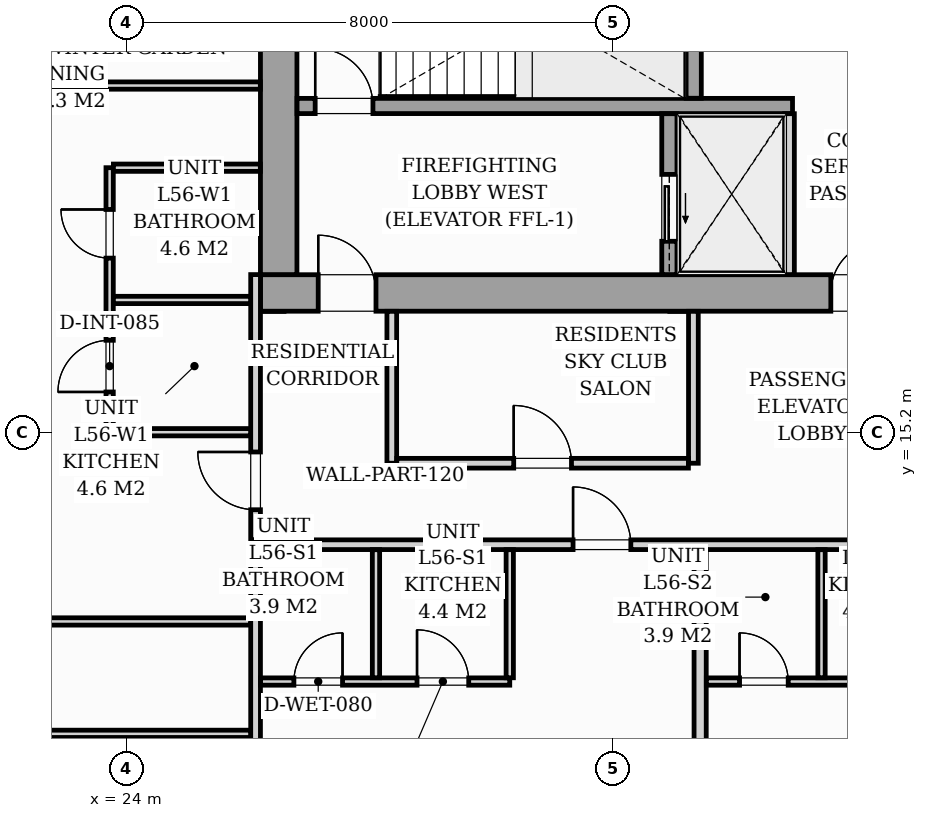
"""IFC4 building model, lengths in metres.
Left out: names, types, materials, properties, quantities, classifications, styles, units other than length and angle.
Written with IfcOpenShell. Run it as: python <this file> out.ifc"""

import sys

from ifc_helpers import new_model, si_unit, direction, frame, frame_2d, origin, origin_2d, place, context, subcontext, project, spatial, rectangle, i_section, extrude, source, transform, mapped, element, fill, save


model = new_model("IFC4")
c1 = context("Model", 3, precision=1e-05, world=origin(), true_north=direction((0.0, 1.0)))
c2 = subcontext(c1, "Body", "Model", "MODEL_VIEW")
j1 = project(units=[si_unit("LENGTHUNIT", "METRE"), si_unit("PLANEANGLEUNIT", "RADIAN")], contexts=[c1])
p1 = place(None, origin())
s1 = spatial("IfcSite", under=j1, at=p1, CompositionType="ELEMENT")
p2 = place(p1, origin())
s2 = spatial("IfcBuilding", under=s1, at=p2, CompositionType="ELEMENT")
p3 = place(p2, frame((0.0, 0.0, 195.4)))
s3 = spatial("IfcBuildingStorey", under=s2, at=p3, CompositionType="ELEMENT", Elevation=195.4)
m1 = source(origin(), c2, "Body", "SweptSolid", [
    extrude(i_section(OverallWidth=0.416, OverallDepth=0.446, WebThickness=0.039, FlangeThickness=0.063, FilletRadius=0.018, at=origin_2d()), origin(), (0.0, 0.0, 1.0), 3.196),
])
for number, where, z_axis, x_axis in (
    (1, (26.4, 17.4, 0.002), (0.0, 0.0, 1.0), (1.0, 0.0, 0.0)),
    (2, (33.12, 17.4, 0.002), (0.0, 0.0, 1.0), (1.0, 0.0, 0.0)),
):
    element("IfcColumn", number, at=place(p3, frame(where, z_axis=z_axis, x_axis=x_axis)), inside=s3, PredefinedType="PILASTER", context=c2, shape_type="MappedRepresentation", body=[
        mapped(m1, transform((0.0, 0.0, 0.0), scale=1.0)),
    ])
p4 = place(p3, frame((26.2, 17.5, 0.0), z_axis=(0.0, 0.0, 1.0), x_axis=(1.0, 0.0, 0.0)))
e3 = element("IfcWall", 3, at=p4, inside=s3, PredefinedType="SHEAR", context=c2, shape_type="SweptSolid", body=[
    extrude(rectangle(XDim=19.6, YDim=0.6, at=frame_2d((9.8, 0.0))), origin(), (0.0, 0.0, 1.0), 3.2),
])
p5 = place(p4, frame((0.95, 0.0, 0.0)))
e4 = element("IfcOpeningElement", 4, at=p5, cuts=e3, PredefinedType="OPENING", context=c2, shape_type="SweptSolid", body=[
    extrude(rectangle(XDim=0.95, YDim=2.06, at=frame_2d((0.475, 1.03))), frame((0.0, 0.31, 0.0), z_axis=(0.0, -1.0, 0.0), x_axis=(1.0, 0.0, 0.0)), (0.0, 0.0, 1.0), 0.62),
])
p6 = place(p4, frame((9.38, 0.0, 0.0)))
e5 = element("IfcOpeningElement", 5, at=p6, cuts=e3, PredefinedType="OPENING", context=c2, shape_type="SweptSolid", body=[
    extrude(rectangle(XDim=0.85, YDim=2.0, at=frame_2d((0.425, 1.0))), frame((0.0, 0.31, 0.0), z_axis=(0.0, -1.0, 0.0), x_axis=(1.0, 0.0, 0.0)), (0.0, 0.0, 1.0), 0.62),
])
p7 = place(p4, frame((17.55, 0.0, 0.0)))
e6 = element("IfcOpeningElement", 6, at=p7, cuts=e3, PredefinedType="OPENING", context=c2, shape_type="SweptSolid", body=[
    extrude(rectangle(XDim=0.95, YDim=2.06, at=frame_2d((0.475, 1.03))), frame((0.0, 0.31, 0.0), z_axis=(0.0, -1.0, 0.0), x_axis=(1.0, 0.0, 0.0)), (0.0, 0.0, 1.0), 0.62),
])
p8 = place(p3, frame((26.5, 17.802, 0.0), z_axis=(0.0, 0.0, 1.0), x_axis=(0.0, 1.0, 0.0)))
e7 = element("IfcWall", 7, at=p8, inside=s3, PredefinedType="SHEAR", context=c2, shape_type="SweptSolid", body=[
    extrude(rectangle(XDim=5.796, YDim=0.6, at=frame_2d((2.898, 0.0))), origin(), (0.0, 0.0, 1.0), 3.2),
])
p9 = place(p3, frame((26.802, 20.575, 0.0), z_axis=(0.0, 0.0, 1.0), x_axis=(1.0, 0.0, 0.0)))
e8 = element("IfcWall", 8, at=p9, inside=s3, PredefinedType="SOLIDWALL", context=c2, shape_type="SweptSolid", body=[
    extrude(rectangle(XDim=8.148, YDim=0.25, at=frame_2d((4.074, 0.0))), origin(), (0.0, 0.0, 1.0), 3.2),
])
p10 = place(p9, frame((0.298, 0.0, 0.0)))
e9 = element("IfcOpeningElement", 9, at=p10, cuts=e8, PredefinedType="OPENING", context=c2, shape_type="SweptSolid", body=[
    extrude(rectangle(XDim=0.95, YDim=2.06, at=frame_2d((0.475, 1.03))), frame((0.0, 0.135, 0.0), z_axis=(0.0, -1.0, 0.0), x_axis=(1.0, 0.0, 0.0)), (0.0, 0.0, 1.0), 0.27),
])
p11 = place(p3, frame((33.325, 20.702, 0.0), z_axis=(0.0, 0.0, 1.0), x_axis=(0.0, 1.0, 0.0)))
e10 = element("IfcWall", 10, at=p11, inside=s3, PredefinedType="SOLIDWALL", context=c2, shape_type="SweptSolid", body=[
    extrude(rectangle(XDim=2.896, YDim=0.25, at=frame_2d((1.448, 0.0))), origin(), (0.0, 0.0, 1.0), 3.2),
])
p12 = place(p3, frame((32.925, 17.802, 0.0), z_axis=(0.0, 0.0, 1.0), x_axis=(0.0, 1.0, 0.0)))
e11 = element("IfcWall", 11, at=p12, inside=s3, PredefinedType="SOLIDWALL", context=c2, shape_type="SweptSolid", body=[
    extrude(rectangle(XDim=2.646, YDim=0.25, at=frame_2d((1.323, 0.0))), origin(), (0.0, 0.0, 1.0), 3.2),
])
p13 = place(p12, frame((0.548, 0.0, 0.0)))
e12 = element("IfcOpeningElement", 12, at=p13, cuts=e11, PredefinedType="OPENING", context=c2, shape_type="SweptSolid", body=[
    extrude(rectangle(XDim=1.1, YDim=2.08, at=frame_2d((0.55, 1.04))), frame((0.0, 0.135, 0.0), z_axis=(0.0, -1.0, 0.0), x_axis=(1.0, 0.0, 0.0)), (0.0, 0.0, 1.0), 0.27),
])
p14 = place(p3, frame((34.9, 17.802, 0.0), z_axis=(0.0, 0.0, 1.0), x_axis=(0.0, 1.0, 0.0)))
e13 = element("IfcWall", 13, at=p14, inside=s3, PredefinedType="PARTITIONING", context=c2, shape_type="SweptSolid", body=[
    extrude(rectangle(XDim=2.646, YDim=0.16, at=frame_2d((1.323, 0.0))), origin(), (0.0, 0.0, 1.0), 2.94),
])
p15 = place(p3, frame((26.12, 13.36, 0.0), z_axis=(0.0, 0.0, 1.0), x_axis=(1.0, 0.0, 0.0)))
e14 = element("IfcWall", 14, at=p15, inside=s3, PredefinedType="PARTITIONING", context=c2, shape_type="SweptSolid", body=[
    extrude(rectangle(XDim=19.76, YDim=0.16, at=frame_2d((9.88, 0.0))), origin(), (0.0, 0.0, 1.0), 2.94),
])
p16 = place(p15, frame((5.221, 0.0, 0.0)))
e15 = element("IfcOpeningElement", 15, at=p16, cuts=e14, PredefinedType="OPENING", context=c2, shape_type="SweptSolid", body=[
    extrude(rectangle(XDim=0.95, YDim=2.06, at=frame_2d((0.475, 1.03))), frame((0.0, 0.09, 0.0), z_axis=(0.0, -1.0, 0.0), x_axis=(1.0, 0.0, 0.0)), (0.0, 0.0, 1.0), 0.18),
])
p17 = place(p15, frame((12.119, 0.0, 0.0)))
e16 = element("IfcOpeningElement", 16, at=p17, cuts=e14, PredefinedType="OPENING", context=c2, shape_type="SweptSolid", body=[
    extrude(rectangle(XDim=0.95, YDim=2.06, at=frame_2d((0.475, 1.03))), frame((0.0, 0.09, 0.0), z_axis=(0.0, -1.0, 0.0), x_axis=(1.0, 0.0, 0.0)), (0.0, 0.0, 1.0), 0.18),
])
p18 = place(p15, frame((14.492, 0.0, 0.0)))
e17 = element("IfcOpeningElement", 17, at=p18, cuts=e14, PredefinedType="OPENING", context=c2, shape_type="SweptSolid", body=[
    extrude(rectangle(XDim=0.95, YDim=2.06, at=frame_2d((0.475, 1.03))), frame((0.0, 0.09, 0.0), z_axis=(0.0, -1.0, 0.0), x_axis=(1.0, 0.0, 0.0)), (0.0, 0.0, 1.0), 0.18),
])
p19 = place(p3, frame((26.12, 7.261, 0.0), z_axis=(0.0, 0.0, 1.0), x_axis=(0.0, 1.0, 0.0)))
e18 = element("IfcWall", 18, at=p19, inside=s3, PredefinedType="PARTITIONING", context=c2, shape_type="SweptSolid", body=[
    extrude(rectangle(XDim=6.017, YDim=0.16, at=frame_2d((3.008, 0.0))), origin(), (0.0, 0.0, 1.0), 2.94),
])
p20 = place(p3, frame((26.12, 13.442, 0.0), z_axis=(0.0, 0.0, 1.0), x_axis=(0.0, 1.0, 0.0)))
e19 = element("IfcWall", 19, at=p20, inside=s3, PredefinedType="PARTITIONING", context=c2, shape_type="SweptSolid", body=[
    extrude(rectangle(XDim=4.36, YDim=0.16, at=frame_2d((2.18, 0.0))), origin(), (0.0, 0.0, 1.0), 2.94),
])
p21 = place(p20, frame((0.493, 0.0, 0.0)))
e20 = element("IfcOpeningElement", 20, at=p21, cuts=e19, PredefinedType="OPENING", context=c2, shape_type="SweptSolid", body=[
    extrude(rectangle(XDim=0.95, YDim=2.06, at=frame_2d((0.475, 1.03))), frame((0.0, 0.09, 0.0), z_axis=(0.0, -1.0, 0.0), x_axis=(1.0, 0.0, 0.0)), (0.0, 0.0, 1.0), 0.18),
])
p22 = place(p3, frame((26.202, 11.11, 0.0), z_axis=(0.0, 0.0, 1.0), x_axis=(1.0, 0.0, 0.0)))
e21 = element("IfcWall", 21, at=p22, inside=s3, PredefinedType="PARTITIONING", context=c2, shape_type="SweptSolid", body=[
    extrude(rectangle(XDim=4.098, YDim=0.12, at=frame_2d((2.049, 0.0))), origin(), (0.0, 0.0, 1.0), 2.94),
])
p23 = place(p22, frame((0.548, 0.0, 0.0)))
e22 = element("IfcOpeningElement", 22, at=p23, cuts=e21, PredefinedType="OPENING", context=c2, shape_type="SweptSolid", body=[
    extrude(rectangle(XDim=0.8, YDim=2.02, at=frame_2d((0.4, 1.01))), frame((0.0, 0.07, 0.0), z_axis=(0.0, -1.0, 0.0), x_axis=(1.0, 0.0, 0.0)), (0.0, 0.0, 1.0), 0.14),
])
p24 = place(p22, frame((2.573, 0.0, 0.0)))
e23 = element("IfcOpeningElement", 23, at=p24, cuts=e21, PredefinedType="OPENING", context=c2, shape_type="SweptSolid", body=[
    extrude(rectangle(XDim=0.85, YDim=2.05, at=frame_2d((0.425, 1.025))), frame((0.0, 0.07, 0.0), z_axis=(0.0, -1.0, 0.0), x_axis=(1.0, 0.0, 0.0)), (0.0, 0.0, 1.0), 0.14),
])
for number, where, z_axis, x_axis in (
    (24, (30.3, 11.172, 0.0), (0.0, 0.0, 1.0), (0.0, 1.0, 0.0)),
    (25, (28.1, 11.172, 0.0), (0.0, 0.0, 1.0), (0.0, 1.0, 0.0)),
):
    element("IfcWall", number, at=place(p3, frame(where, z_axis=z_axis, x_axis=x_axis)), inside=s3, PredefinedType="PARTITIONING", context=c2, shape_type="SweptSolid", body=[
        extrude(rectangle(XDim=2.106, YDim=0.12, at=frame_2d((1.053, 0.0))), origin(), (0.0, 0.0, 1.0), 2.94),
    ])
p25 = place(p3, frame((33.431, 7.782, 0.0), z_axis=(0.0, 0.0, 1.0), x_axis=(0.0, 1.0, 0.0)))
e26 = element("IfcWall", 26, at=p25, inside=s3, PredefinedType="PARTITIONING", context=c2, shape_type="SweptSolid", body=[
    extrude(rectangle(XDim=5.496, YDim=0.2, at=frame_2d((2.748, 0.0))), origin(), (0.0, 0.0, 1.0), 2.94),
])
p26 = place(p3, frame((33.533, 11.11, 0.0), z_axis=(0.0, 0.0, 1.0), x_axis=(1.0, 0.0, 0.0)))
e27 = element("IfcWall", 27, at=p26, inside=s3, PredefinedType="PARTITIONING", context=c2, shape_type="SweptSolid", body=[
    extrude(rectangle(XDim=4.043, YDim=0.12, at=frame_2d((2.021, 0.0))), origin(), (0.0, 0.0, 1.0), 2.94),
])
p27 = place(p26, frame((0.546, 0.0, 0.0)))
e28 = element("IfcOpeningElement", 28, at=p27, cuts=e27, PredefinedType="OPENING", context=c2, shape_type="SweptSolid", body=[
    extrude(rectangle(XDim=0.8, YDim=2.02, at=frame_2d((0.4, 1.01))), frame((0.0, 0.07, 0.0), z_axis=(0.0, -1.0, 0.0), x_axis=(1.0, 0.0, 0.0)), (0.0, 0.0, 1.0), 0.14),
])
p28 = place(p26, frame((2.544, 0.0, 0.0)))
e29 = element("IfcOpeningElement", 29, at=p28, cuts=e27, PredefinedType="OPENING", context=c2, shape_type="SweptSolid", body=[
    extrude(rectangle(XDim=0.85, YDim=2.05, at=frame_2d((0.425, 1.025))), frame((0.0, 0.07, 0.0), z_axis=(0.0, -1.0, 0.0), x_axis=(1.0, 0.0, 0.0)), (0.0, 0.0, 1.0), 0.14),
])
p29 = place(p3, frame((35.427, 11.172, 0.0), z_axis=(0.0, 0.0, 1.0), x_axis=(0.0, 1.0, 0.0)))
e30 = element("IfcWall", 30, at=p29, inside=s3, PredefinedType="PARTITIONING", context=c2, shape_type="SweptSolid", body=[
    extrude(rectangle(XDim=2.106, YDim=0.12, at=frame_2d((1.053, 0.0))), origin(), (0.0, 0.0, 1.0), 2.94),
])
p30 = place(p3, frame((23.72, 15.21, 0.0), z_axis=(0.0, 0.0, 1.0), x_axis=(0.0, 1.0, 0.0)))
e31 = element("IfcWall", 31, at=p30, inside=s3, PredefinedType="PARTITIONING", context=c2, shape_type="SweptSolid", body=[
    extrude(rectangle(XDim=4.35, YDim=0.12, at=frame_2d((2.175, 0.0))), origin(), (0.0, 0.0, 1.0), 2.94),
])
p31 = place(p30, frame((0.662, 0.0, 0.0)))
e32 = element("IfcOpeningElement", 32, at=p31, cuts=e31, PredefinedType="OPENING", context=c2, shape_type="SweptSolid", body=[
    extrude(rectangle(XDim=0.85, YDim=2.05, at=frame_2d((0.425, 1.025))), frame((0.0, 0.07, 0.0), z_axis=(0.0, -1.0, 0.0), x_axis=(1.0, 0.0, 0.0)), (0.0, 0.0, 1.0), 0.14),
])
p32 = place(p30, frame((2.863, 0.0, 0.0)))
e33 = element("IfcOpeningElement", 33, at=p32, cuts=e31, PredefinedType="OPENING", context=c2, shape_type="SweptSolid", body=[
    extrude(rectangle(XDim=0.8, YDim=2.02, at=frame_2d((0.4, 1.01))), frame((0.0, 0.07, 0.0), z_axis=(0.0, -1.0, 0.0), x_axis=(1.0, 0.0, 0.0)), (0.0, 0.0, 1.0), 0.14),
])
p33 = place(p3, frame((23.782, 17.385, 0.0), z_axis=(0.0, 0.0, 1.0), x_axis=(1.0, 0.0, 0.0)))
e34 = element("IfcWall", 34, at=p33, inside=s3, PredefinedType="PARTITIONING", context=c2, shape_type="SweptSolid", body=[
    extrude(rectangle(XDim=2.256, YDim=0.12, at=frame_2d((1.128, 0.0))), origin(), (0.0, 0.0, 1.0), 2.281),
])
p34 = place(p3, frame((23.782, 15.21, 0.0), z_axis=(0.0, 0.0, 1.0), x_axis=(1.0, 0.0, 0.0)))
e35 = element("IfcWall", 35, at=p34, inside=s3, PredefinedType="PARTITIONING", context=c2, shape_type="SweptSolid", body=[
    extrude(rectangle(XDim=2.256, YDim=0.12, at=frame_2d((1.128, 0.0))), origin(), (0.0, 0.0, 1.0), 2.94),
])
p35 = place(p3, frame((23.782, 19.56, 0.0), z_axis=(0.0, 0.0, 1.0), x_axis=(1.0, 0.0, 0.0)))
e36 = element("IfcWall", 36, at=p35, inside=s3, PredefinedType="PARTITIONING", context=c2, shape_type="SweptSolid", body=[
    extrude(rectangle(XDim=2.416, YDim=0.12, at=frame_2d((1.208, 0.0))), origin(), (0.0, 0.0, 1.0), 2.94),
])
p36 = place(p3, frame((14.361, 10.25, 0.0), z_axis=(0.0, 0.0, 1.0), x_axis=(1.0, 0.0, 0.0)))
e37 = element("IfcWall", 37, at=p36, inside=s3, PredefinedType="PARTITIONING", context=c2, shape_type="SweptSolid", body=[
    extrude(rectangle(XDim=11.677, YDim=0.12, at=frame_2d((5.839, 0.0))), origin(), (0.0, 0.0, 1.0), 2.94),
])
p37 = place(p36, frame((5.407, 0.0, 0.0)))
e38 = element("IfcOpeningElement", 38, at=p37, cuts=e37, PredefinedType="OPENING", context=c2, shape_type="SweptSolid", body=[
    extrude(rectangle(XDim=0.85, YDim=2.05, at=frame_2d((0.425, 1.025))), frame((0.0, 0.07, 0.0), z_axis=(0.0, -1.0, 0.0), x_axis=(1.0, 0.0, 0.0)), (0.0, 0.0, 1.0), 0.14),
])
p38 = place(p3, frame((14.183, 12.098, 0.0), z_axis=(0.0, 0.0, 1.0), x_axis=(1.0, 0.0, 0.0)))
e39 = element("IfcWall", 39, at=p38, inside=s3, PredefinedType="PARTITIONING", context=c2, shape_type="SweptSolid", body=[
    extrude(rectangle(XDim=11.855, YDim=0.12, at=frame_2d((5.928, 0.0))), origin(), (0.0, 0.0, 1.0), 2.94),
])
p39 = place(p38, frame((5.496, 0.0, 0.0)))
e40 = element("IfcOpeningElement", 40, at=p39, cuts=e39, PredefinedType="OPENING", context=c2, shape_type="SweptSolid", body=[
    extrude(rectangle(XDim=0.85, YDim=2.05, at=frame_2d((0.425, 1.025))), frame((0.0, 0.07, 0.0), z_axis=(0.0, -1.0, 0.0), x_axis=(1.0, 0.0, 0.0)), (0.0, 0.0, 1.0), 0.14),
])
p40 = place(p3, frame((13.334, 20.911, 0.0), z_axis=(0.0, 0.0, 1.0), x_axis=(1.0, 0.0, 0.0)))
e41 = element("IfcWall", 41, at=p40, inside=s3, PredefinedType="PARTITIONING", context=c2, shape_type="SweptSolid", body=[
    extrude(rectangle(XDim=12.864, YDim=0.12, at=frame_2d((6.432, 0.0))), origin(), (0.0, 0.0, 1.0), 2.94),
])
p41 = place(p40, frame((5.881, 0.0, 0.0)))
e42 = element("IfcOpeningElement", 42, at=p41, cuts=e41, PredefinedType="OPENING", context=c2, shape_type="SweptSolid", body=[
    extrude(rectangle(XDim=0.85, YDim=2.05, at=frame_2d((0.425, 1.025))), frame((0.0, 0.07, 0.0), z_axis=(0.0, -1.0, 0.0), x_axis=(1.0, 0.0, 0.0)), (0.0, 0.0, 1.0), 0.14),
])
for number, where, z_axis, x_axis in (
    (43, (28.36, 14.7, 0.0), (0.0, 0.0, 1.0), (0.0, 1.0, 0.0)),
    (44, (33.32, 14.7, 0.0), (0.0, 0.0, 1.0), (0.0, 1.0, 0.0)),
):
    element("IfcWall", number, at=place(p3, frame(where, z_axis=z_axis, x_axis=x_axis)), inside=s3, PredefinedType="PARTITIONING", context=c2, shape_type="SweptSolid", body=[
        extrude(rectangle(XDim=2.498, YDim=0.16, at=frame_2d((1.249, 0.0))), origin(), (0.0, 0.0, 1.0), 2.94),
    ])
p42 = place(p3, frame((28.442, 14.7, 0.0), z_axis=(0.0, 0.0, 1.0), x_axis=(1.0, 0.0, 0.0)))
e45 = element("IfcWall", 45, at=p42, inside=s3, PredefinedType="PARTITIONING", context=c2, shape_type="SweptSolid", body=[
    extrude(rectangle(XDim=4.796, YDim=0.16, at=frame_2d((2.398, 0.0))), origin(), (0.0, 0.0, 1.0), 2.94),
])
p43 = place(p42, frame((1.923, 0.0, 0.0)))
e46 = element("IfcOpeningElement", 46, at=p43, cuts=e45, PredefinedType="OPENING", context=c2, shape_type="SweptSolid", body=[
    extrude(rectangle(XDim=0.95, YDim=2.06, at=frame_2d((0.475, 1.03))), frame((0.0, 0.09, 0.0), z_axis=(0.0, -1.0, 0.0), x_axis=(1.0, 0.0, 0.0)), (0.0, 0.0, 1.0), 0.18),
])
m2 = source(origin(), c2, "Body", "SweptSolid", [
    extrude(rectangle(XDim=0.95, YDim=2.06, at=frame_2d((0.475, 1.03))), frame((0.0, 0.025, 0.0), z_axis=(0.0, -1.0, 0.0), x_axis=(1.0, 0.0, 0.0)), (0.0, 0.0, 1.0), 0.05),
])
p44 = place(p5, origin())
e47 = element("IfcDoor", 47, at=p44, inside=s3, OperationType="SINGLE_SWING_LEFT", PredefinedType="DOOR", context=c2, shape_type="MappedRepresentation", body=[
    mapped(m2, transform((0.0, 0.0, 0.0), scale=1.0)),
])
fill(e4, e47)
m3 = source(origin(), c2, "Body", "SweptSolid", [
    extrude(rectangle(XDim=0.85, YDim=2.0, at=frame_2d((0.425, 1.0))), frame((0.0, 0.025, 0.0), z_axis=(0.0, -1.0, 0.0), x_axis=(1.0, 0.0, 0.0)), (0.0, 0.0, 1.0), 0.05),
])
p45 = place(p6, origin())
e48 = element("IfcDoor", 48, at=p45, inside=s3, OperationType="SINGLE_SWING_RIGHT", PredefinedType="DOOR", context=c2, shape_type="MappedRepresentation", body=[
    mapped(m3, transform((0.0, 0.0, 0.0), scale=1.0)),
])
fill(e5, e48)
p46 = place(p10, origin())
e49 = element("IfcDoor", 49, at=p46, inside=s3, OperationType="SINGLE_SWING_LEFT", PredefinedType="DOOR", context=c2, shape_type="MappedRepresentation", body=[
    mapped(m2, transform((0.0, 0.0, 0.0), scale=1.0)),
])
fill(e9, e49)
m4 = source(origin(), c2, "Body", "SweptSolid", [
    extrude(rectangle(XDim=1.1, YDim=2.08, at=frame_2d((0.55, 1.04))), frame((0.0, 0.025, 0.0), z_axis=(0.0, -1.0, 0.0), x_axis=(1.0, 0.0, 0.0)), (0.0, 0.0, 1.0), 0.05),
])
p47 = place(p13, origin())
e50 = element("IfcDoor", 50, at=p47, inside=s3, OperationType="SLIDING_TO_LEFT", PredefinedType="DOOR", context=c2, shape_type="MappedRepresentation", body=[
    mapped(m4, transform((0.0, 0.0, 0.0), scale=1.0)),
])
fill(e12, e50)
m5 = source(origin(), c2, "Body", "SweptSolid", [
    extrude(rectangle(XDim=0.95, YDim=2.06, at=frame_2d((0.475, 1.03))), frame((0.0, 0.025, 0.0), z_axis=(0.0, -1.0, 0.0), x_axis=(1.0, 0.0, 0.0)), (0.0, 0.0, 1.0), 0.05),
])
p48 = place(p16, origin())
e51 = element("IfcDoor", 51, at=p48, inside=s3, OperationType="SINGLE_SWING_LEFT", PredefinedType="DOOR", context=c2, shape_type="MappedRepresentation", body=[
    mapped(m5, transform((0.0, 0.0, 0.0), scale=1.0)),
])
fill(e15, e51)
m6 = source(origin(), c2, "Body", "SweptSolid", [
    extrude(rectangle(XDim=0.8, YDim=2.02, at=frame_2d((0.4, 1.01))), frame((0.0, 0.025, 0.0), z_axis=(0.0, -1.0, 0.0), x_axis=(1.0, 0.0, 0.0)), (0.0, 0.0, 1.0), 0.05),
])
p49 = place(p23, origin())
e52 = element("IfcDoor", 52, at=p49, inside=s3, OperationType="SINGLE_SWING_RIGHT", PredefinedType="DOOR", context=c2, shape_type="MappedRepresentation", body=[
    mapped(m6, transform((0.0, 0.0, 0.0), scale=1.0)),
])
fill(e22, e52)
m7 = source(origin(), c2, "Body", "SweptSolid", [
    extrude(rectangle(XDim=0.85, YDim=2.05, at=frame_2d((0.425, 1.025))), frame((0.0, 0.025, 0.0), z_axis=(0.0, -1.0, 0.0), x_axis=(1.0, 0.0, 0.0)), (0.0, 0.0, 1.0), 0.05),
])
p50 = place(p24, origin())
e53 = element("IfcDoor", 53, at=p50, inside=s3, OperationType="SINGLE_SWING_LEFT", PredefinedType="DOOR", context=c2, shape_type="MappedRepresentation", body=[
    mapped(m7, transform((0.0, 0.0, 0.0), scale=1.0)),
])
fill(e23, e53)
p51 = place(p27, origin())
e54 = element("IfcDoor", 54, at=p51, inside=s3, OperationType="SINGLE_SWING_LEFT", PredefinedType="DOOR", context=c2, shape_type="MappedRepresentation", body=[
    mapped(m6, transform((0.0, 0.0, 0.0), scale=1.0)),
])
fill(e28, e54)
p52 = place(p21, origin())
e55 = element("IfcDoor", 55, at=p52, inside=s3, OperationType="SINGLE_SWING_RIGHT", PredefinedType="DOOR", context=c2, shape_type="MappedRepresentation", body=[
    mapped(m5, transform((0.0, 0.0, 0.0), scale=1.0)),
])
fill(e20, e55)
p53 = place(p31, origin())
e56 = element("IfcDoor", 56, at=p53, inside=s3, OperationType="SINGLE_SWING_LEFT", PredefinedType="DOOR", context=c2, shape_type="MappedRepresentation", body=[
    mapped(m7, transform((0.0, 0.0, 0.0), scale=1.0)),
])
fill(e32, e56)
p54 = place(p32, origin())
e57 = element("IfcDoor", 57, at=p54, inside=s3, OperationType="SINGLE_SWING_RIGHT", PredefinedType="DOOR", context=c2, shape_type="MappedRepresentation", body=[
    mapped(m6, transform((0.0, 0.0, 0.0), scale=1.0)),
])
fill(e33, e57)
p55 = place(p43, origin())
e58 = element("IfcDoor", 58, at=p55, inside=s3, OperationType="SINGLE_SWING_LEFT", PredefinedType="DOOR", context=c2, shape_type="MappedRepresentation", body=[
    mapped(m5, transform((0.0, 0.0, 0.0), scale=1.0)),
])
fill(e46, e58)
save(model, sys.argv[1])
